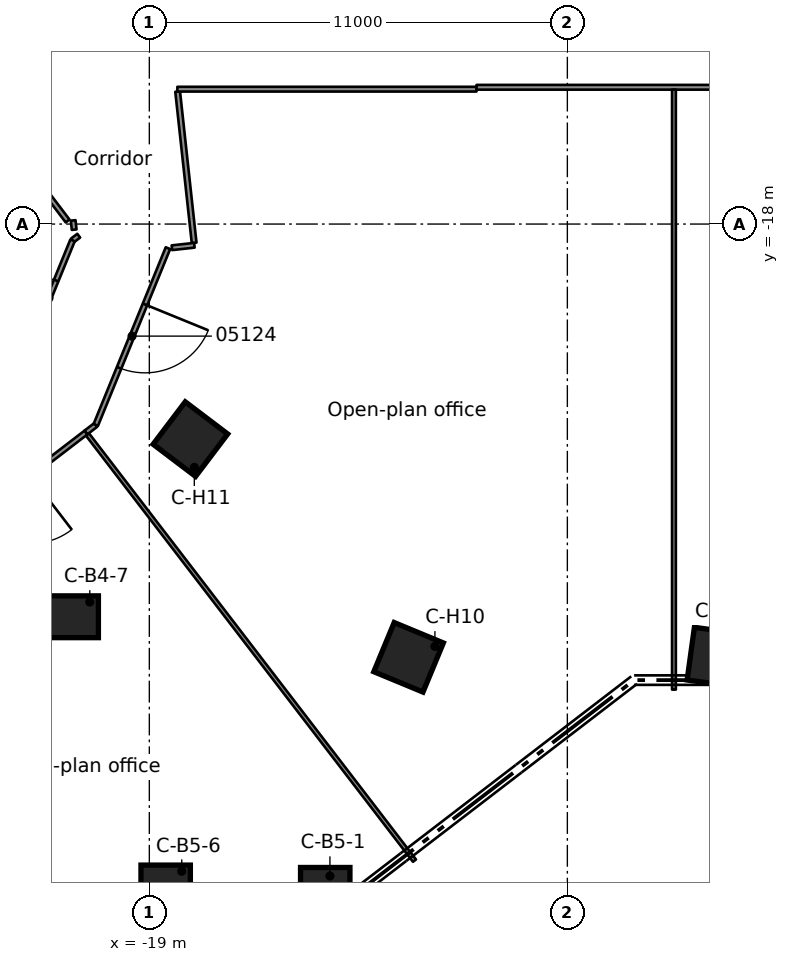
"""IFC4 building model, lengths in metres.
Left out: names, types, materials, properties, quantities, classifications, styles, units other than length and angle.
Written with IfcOpenShell. Run it as: python <this file> out.ifc"""

import sys

from ifc_helpers import new_model, si_unit, direction, frame, frame_2d, origin, origin_2d, place, context, subcontext, project, spatial, rectangle, extrude, element, fill, save


model = new_model("IFC4")
c1 = context("Model", 3, precision=1e-05, world=origin(), true_north=direction((0.0, 1.0)))
c2 = subcontext(c1, "Body", "Model", "MODEL_VIEW")
j1 = project(units=[si_unit("LENGTHUNIT", "METRE"), si_unit("PLANEANGLEUNIT", "RADIAN")], contexts=[c1])
p1 = place(None, origin())
s1 = spatial("IfcSite", under=j1, at=p1, CompositionType="ELEMENT")
p2 = place(p1, origin())
s2 = spatial("IfcBuilding", under=s1, at=p2, CompositionType="ELEMENT")
p3 = place(p2, frame((0.0, 0.0, 25.1)))
s3 = spatial("IfcBuildingStorey", under=s2, at=p3, CompositionType="ELEMENT", Elevation=25.1)
for number, where, z_axis, x_axis in (
    (1, (-20.99, -28.333, 0.0), (0.0, 0.0, 1.0), (1.0, 0.0, 0.0)),
    (2, (-14.371, -35.48, 0.0), (0.0, 0.0, 1.0), (1.0, 0.0, 0.0)),
    (3, (-18.57, -35.417, 0.0), (0.0, 0.0, 1.0), (1.0, 0.0, 0.0)),
):
    element("IfcColumn", number, at=place(p3, frame(where, z_axis=z_axis, x_axis=x_axis)), inside=s3, PredefinedType="COLUMN", context=c2, shape_type="SweptSolid", body=[
        extrude(rectangle(XDim=1.3, YDim=1.1, at=origin_2d()), origin(), (0.0, 0.0, 1.0), 4.1),
    ])
for number, where, z_axis, x_axis in (
    (4, (-4.059, -29.4, 0.0), (0.0, 0.0, 1.0), (-0.137, -0.991, 0.0)),
    (5, (-12.178, -29.4, 0.0), (0.0, 0.0, 1.0), (-0.383, -0.924, 0.0)),
    (6, (-17.919, -23.659, 0.0), (0.0, 0.0, 1.0), (-0.604, -0.797, 0.0)),
):
    element("IfcColumn", number, at=place(p3, frame(where, z_axis=z_axis, x_axis=x_axis)), inside=s3, PredefinedType="COLUMN", context=c2, shape_type="SweptSolid", body=[
        extrude(rectangle(XDim=1.4, YDim=1.4, at=origin_2d()), origin(), (0.0, 0.0, 1.0), 4.1),
    ])
p4 = place(p3, frame((-21.004, -17.904, 0.0), z_axis=(0.0, 0.0, 1.0), x_axis=(0.105933230141, -0.994373245191, 0.0)))
e7 = element("IfcWall", 7, at=p4, inside=s3, PredefinedType="PARTITIONING", context=c2, shape_type="SweptSolid", body=[
    extrude(rectangle(XDim=0.244, YDim=0.125, at=frame_2d((0.122, 0.0))), origin(), (0.0, 0.0, 1.0), 3.68),
])
p5 = place(p3, frame((-18.255, -14.513, 0.0), z_axis=(0.0, 0.0, 1.0), x_axis=(0.108304050005, -0.994117816334, 0.0)))
e8 = element("IfcWall", 8, at=p5, inside=s3, PredefinedType="PARTITIONING", context=c2, shape_type="SweptSolid", body=[
    extrude(rectangle(XDim=4.006, YDim=0.125, at=frame_2d((2.003, 0.0))), origin(), (0.0, 0.0, 1.0), 3.68),
])
p6 = place(p3, frame((-21.801, -17.061, 0.0), z_axis=(0.0, 0.0, 1.0), x_axis=(0.604123687543, -0.796890563471, 0.0)))
e9 = element("IfcWall", 9, at=p6, inside=s3, PredefinedType="PARTITIONING", context=c2, shape_type="SweptSolid", body=[
    extrude(rectangle(XDim=1.078, YDim=0.125, at=frame_2d((0.539, 0.0))), origin(), (0.0, 0.0, 1.0), 3.68),
])
p7 = place(p3, frame((-29.282, -30.176, 0.0), z_axis=(0.0, 0.0, 1.0), x_axis=(0.608773787241, -0.793343857333, 0.0)))
e10 = element("IfcWall", 10, at=p7, inside=s3, PredefinedType="PARTITIONING", context=c2, shape_type="SweptSolid", body=[
    extrude(rectangle(XDim=14.135, YDim=0.1, at=frame_2d((7.067, 0.0))), origin(), (0.0, 0.0, 1.0), 3.68),
])
p8 = place(p3, frame((-20.629, -23.535, 0.0), z_axis=(0.0, 0.0, 1.0), x_axis=(0.608775561638, -0.793342495743, 0.0)))
e11 = element("IfcWall", 11, at=p8, inside=s3, PredefinedType="PARTITIONING", context=c2, shape_type="SweptSolid", body=[
    extrude(rectangle(XDim=14.136, YDim=0.1, at=frame_2d((7.068, 0.0))), origin(), (0.0, 0.0, 1.0), 3.68),
])
p9 = place(p3, frame((-18.262, -14.451, 0.0), z_axis=(0.0, 0.0, 1.0), x_axis=(1.0, 0.0, 0.0)))
e12 = element("IfcWall", 12, at=p9, inside=s3, PredefinedType="PARTITIONING", context=c2, shape_type="SweptSolid", body=[
    extrude(rectangle(XDim=7.871, YDim=0.125, at=frame_2d((3.936, 0.0))), origin(), (0.0, 0.0, 1.0), 3.68),
])
p10 = place(p3, frame((10.391, -14.401, 0.0), z_axis=(0.0, 0.0, 1.0), x_axis=(-1.0, 0.0, 0.0)))
e13 = element("IfcWall", 13, at=p10, inside=s3, PredefinedType="PARTITIONING", context=c2, shape_type="SweptSolid", body=[
    extrude(rectangle(XDim=20.781, YDim=0.125, at=frame_2d((10.391, 0.0))), origin(), (0.0, 0.0, 1.0), 3.68),
])
p11 = place(p10, frame((12.491, 0.0, 0.0)))
e14 = element("IfcOpeningElement", 14, at=p11, cuts=e13, PredefinedType="OPENING", context=c2, shape_type="SweptSolid", body=[
    extrude(rectangle(XDim=0.9, YDim=2.1, at=frame_2d((0.45, 1.05))), frame((0.0, 0.073, 0.0), z_axis=(0.0, -1.0, 0.0), x_axis=(1.0, 0.0, 0.0)), (0.0, 0.0, 1.0), 0.145),
])
p12 = place(p10, frame((7.295, 0.0, 0.0)))
e15 = element("IfcOpeningElement", 15, at=p12, cuts=e13, PredefinedType="OPENING", context=c2, shape_type="SweptSolid", body=[
    extrude(rectangle(XDim=0.9, YDim=2.1, at=frame_2d((0.45, 1.05))), frame((0.0, 0.073, 0.0), z_axis=(0.0, -1.0, 0.0), x_axis=(1.0, 0.0, 0.0)), (0.0, 0.0, 1.0), 0.145),
])
p13 = place(p3, frame((-18.406, -18.623, 0.0), z_axis=(0.0, 0.0, 1.0), x_axis=(0.99401818143, 0.109214719645, 0.0)))
e16 = element("IfcWall", 16, at=p13, inside=s3, PredefinedType="PARTITIONING", context=c2, shape_type="SweptSolid", body=[
    extrude(rectangle(XDim=0.595, YDim=0.125, at=frame_2d((0.297, 0.0))), origin(), (0.0, 0.0, 1.0), 3.68),
])
p14 = place(p3, frame((-21.019, -18.428, 0.0), z_axis=(0.0, 0.0, 1.0), x_axis=(0.797092148154, 0.603857687995, 0.0)))
e17 = element("IfcWall", 17, at=p14, inside=s3, PredefinedType="PARTITIONING", context=c2, shape_type="SweptSolid", body=[
    extrude(rectangle(XDim=0.202, YDim=0.125, at=frame_2d((0.101, 0.0))), origin(), (0.0, 0.0, 1.0), 3.68),
])
p15 = place(p3, frame((-20.668, -23.484, 0.0), z_axis=(0.0, 0.0, 1.0), x_axis=(0.794079485755, 0.607813927368, 0.0)))
e18 = element("IfcWall", 18, at=p15, inside=s3, PredefinedType="PARTITIONING", context=c2, shape_type="SweptSolid", body=[
    extrude(rectangle(XDim=0.324, YDim=0.125, at=frame_2d((0.162, 0.0))), origin(), (0.0, 0.0, 1.0), 3.68),
])
p16 = place(p3, frame((-20.669, -23.487, 0.0), z_axis=(0.0, 0.0, 1.0), x_axis=(-0.793372266626, -0.608736762935, 0.0)))
e19 = element("IfcWall", 19, at=p16, inside=s3, PredefinedType="PARTITIONING", context=c2, shape_type="SweptSolid", body=[
    extrude(rectangle(XDim=9.889, YDim=0.125, at=frame_2d((4.945, 0.0))), origin(), (0.0, 0.0, 1.0), 3.68),
])
p17 = place(p16, frame((1.849, 0.0, 0.0)))
e20 = element("IfcOpeningElement", 20, at=p17, cuts=e19, PredefinedType="OPENING", context=c2, shape_type="SweptSolid", body=[
    extrude(rectangle(XDim=1.8, YDim=2.1, at=frame_2d((0.9, 1.05))), frame((0.0, 0.073, 0.0), z_axis=(0.0, -1.0, 0.0), x_axis=(1.0, 0.0, 0.0)), (0.0, 0.0, 1.0), 0.145),
])
p18 = place(p3, frame((-18.51, -18.634, 0.0), z_axis=(0.0, 0.0, 1.0), x_axis=(-0.377932698015, -0.925833071224, 0.0)))
e21 = element("IfcWall", 21, at=p18, inside=s3, PredefinedType="PARTITIONING", context=c2, shape_type="SweptSolid", body=[
    extrude(rectangle(XDim=5.024, YDim=0.125, at=frame_2d((2.512, 0.0))), origin(), (0.0, 0.0, 1.0), 3.68),
])
p19 = place(p18, frame((1.6, 0.0, 0.0)))
e22 = element("IfcOpeningElement", 22, at=p19, cuts=e21, PredefinedType="OPENING", context=c2, shape_type="SweptSolid", body=[
    extrude(rectangle(XDim=1.8, YDim=2.1, at=frame_2d((0.9, 1.05))), frame((0.0, 0.073, 0.0), z_axis=(0.0, -1.0, 0.0), x_axis=(1.0, 0.0, 0.0)), (0.0, 0.0, 1.0), 0.145),
])
p20 = place(p3, frame((-22.387, -21.778, 0.0), z_axis=(0.0, 0.0, 1.0), x_axis=(0.377843834017, 0.925869341265, 0.0)))
e23 = element("IfcWall", 23, at=p20, inside=s3, PredefinedType="PARTITIONING", context=c2, shape_type="SweptSolid", body=[
    extrude(rectangle(XDim=3.615, YDim=0.125, at=frame_2d((1.808, 0.0))), origin(), (0.0, 0.0, 1.0), 3.68),
])
p21 = place(p20, frame((1.476, 0.0, 0.0)))
e24 = element("IfcOpeningElement", 24, at=p21, cuts=e23, PredefinedType="OPENING", context=c2, shape_type="SweptSolid", body=[
    extrude(rectangle(XDim=1.0, YDim=2.1, at=frame_2d((0.5, 1.05))), frame((0.0, 0.073, 0.0), z_axis=(0.0, -1.0, 0.0), x_axis=(1.0, 0.0, 0.0)), (0.0, 0.0, 1.0), 0.145),
])
p22 = place(p3, frame((-5.195, -30.25, 0.0), z_axis=(0.0, 0.0, 1.0), x_axis=(0.0, 1.0, 0.0)))
e25 = element("IfcWall", 25, at=p22, inside=s3, PredefinedType="PARTITIONING", context=c2, shape_type="SweptSolid", body=[
    extrude(rectangle(XDim=15.787, YDim=0.1, at=frame_2d((7.894, 0.0))), origin(), (0.0, 0.0, 1.0), 3.68),
])
p23 = place(p21, origin())
e26 = element("IfcDoor", 26, at=p23, inside=s3, OperationType="SINGLE_SWING_RIGHT", PredefinedType="DOOR", context=c2, shape_type="SweptSolid", body=[
    extrude(rectangle(XDim=1.0, YDim=2.1, at=frame_2d((0.5, 1.05))), frame((0.0, 0.025, 0.0), z_axis=(0.0, -1.0, 0.0), x_axis=(1.0, 0.0, 0.0)), (0.0, 0.0, 1.0), 0.05),
])
fill(e24, e26)
p24 = place(p19, origin())
e27 = element("IfcDoor", 27, at=p24, inside=s3, OperationType="DOUBLE_DOOR_SINGLE_SWING", PredefinedType="DOOR", context=c2, shape_type="SweptSolid", body=[
    extrude(rectangle(XDim=1.8, YDim=2.1, at=frame_2d((0.9, 1.05))), frame((0.0, 0.025, 0.0), z_axis=(0.0, -1.0, 0.0), x_axis=(1.0, 0.0, 0.0)), (0.0, 0.0, 1.0), 0.05),
])
fill(e22, e27)
save(model, sys.argv[1])
